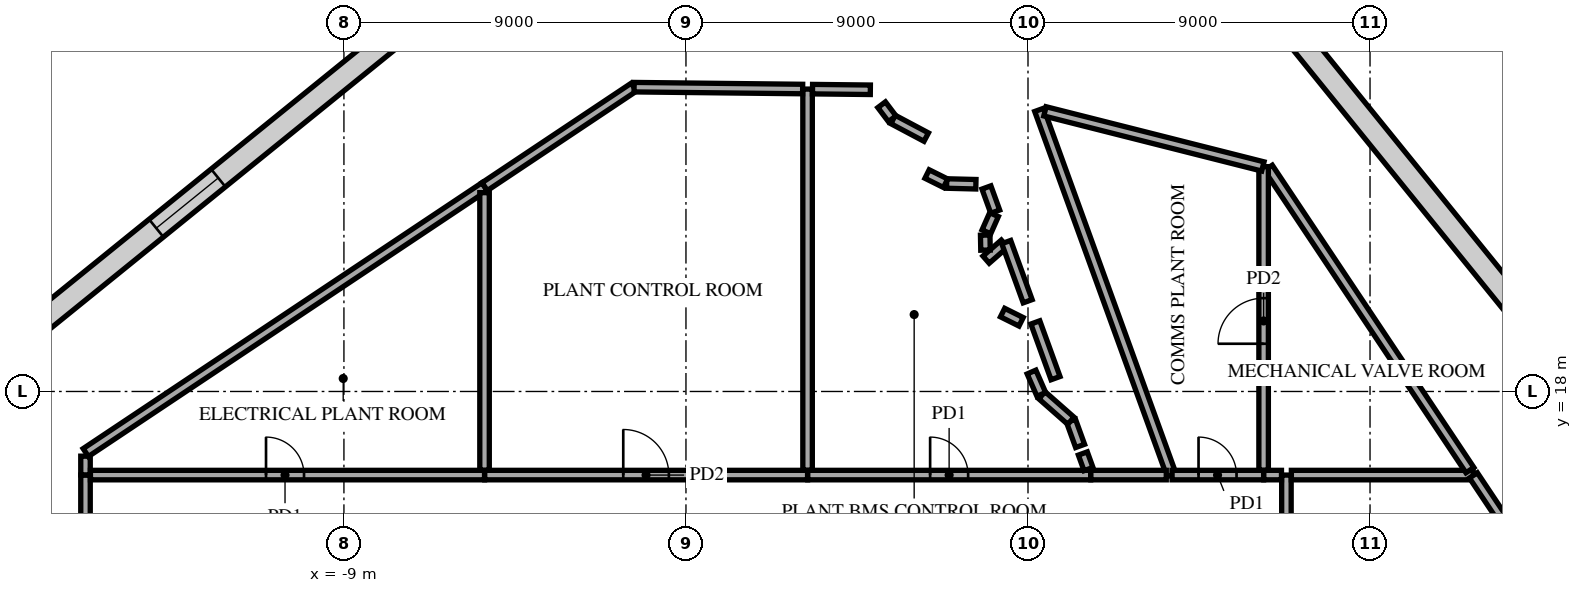
"""IFC4 building model, lengths in metres.
Left out: names, types, materials, properties, quantities, classifications, styles, units other than length and angle.
Written with IfcOpenShell. Run it as: python <this file> out.ifc"""

import sys

from ifc_helpers import new_model, si_unit, direction, frame, frame_2d, origin, place, context, subcontext, project, spatial, rectangle, extrude, element, fill, save


model = new_model("IFC4")
c1 = context("Model", 3, precision=1e-05, world=origin(), true_north=direction((0.0, 1.0)))
c2 = subcontext(c1, "Body", "Model", "MODEL_VIEW")
j1 = project(units=[si_unit("LENGTHUNIT", "METRE"), si_unit("PLANEANGLEUNIT", "RADIAN")], contexts=[c1])
p1 = place(None, origin())
s1 = spatial("IfcSite", under=j1, at=p1, CompositionType="ELEMENT")
p2 = place(p1, origin())
s2 = spatial("IfcBuilding", under=s1, at=p2, CompositionType="ELEMENT")
p3 = place(p2, frame((0.0, 0.0, 183.7)))
s3 = spatial("IfcBuildingStorey", under=s2, at=p3, CompositionType="ELEMENT", Elevation=183.7)
p4 = place(p3, frame((15.8, 7.305, 0.0), z_axis=(0.0, 0.0, 1.0), x_axis=(0.0, 1.0, 0.0)))
e1 = element("IfcWall", 1, at=p4, inside=s3, PredefinedType="PARTITIONING", context=c2, shape_type="SweptSolid", body=[
    extrude(rectangle(XDim=8.495, YDim=0.25, at=frame_2d((4.248, 0.0))), origin(), (0.0, 0.0, 1.0), 4.65),
])
p5 = place(p4, frame((3.645, 0.0, 0.0)))
e2 = element("IfcOpeningElement", 2, at=p5, cuts=e1, PredefinedType="OPENING", context=c2, shape_type="SweptSolid", body=[
    extrude(rectangle(XDim=1.2, YDim=2.1, at=frame_2d((0.6, 1.05))), frame((0.0, 0.135, 0.0), z_axis=(0.0, -1.0, 0.0), x_axis=(1.0, 0.0, 0.0)), (0.0, 0.0, 1.0), 0.27),
])
p6 = place(p3, frame((-15.8, 10.254, 0.0), z_axis=(0.0, 0.0, 1.0), x_axis=(0.0, 1.0, 0.0)))
e3 = element("IfcWall", 3, at=p6, inside=s3, PredefinedType="PARTITIONING", context=c2, shape_type="SweptSolid", body=[
    extrude(rectangle(XDim=5.546, YDim=0.25, at=frame_2d((2.773, 0.0))), origin(), (0.0, 0.0, 1.0), 4.65),
])
p7 = place(p3, frame((-15.8, 15.805, 0.0), z_axis=(0.0, 0.0, 1.0), x_axis=(0.0, 1.0, 0.0)))
e4 = element("IfcWall", 4, at=p7, inside=s3, PredefinedType="PARTITIONING", context=c2, shape_type="SweptSolid", body=[
    extrude(rectangle(XDim=0.493, YDim=0.25, at=frame_2d((0.246, 0.0))), origin(), (0.0, 0.0, 1.0), 4.386),
])
p8 = place(p3, frame((-15.67, 15.8, 0.0), z_axis=(0.0, 0.0, 1.0), x_axis=(1.0, 0.0, 0.0)))
e5 = element("IfcWall", 5, at=p8, inside=s3, PredefinedType="PARTITIONING", context=c2, shape_type="SweptSolid", body=[
    extrude(rectangle(XDim=10.37, YDim=0.25, at=frame_2d((5.185, 0.0))), origin(), (0.0, 0.0, 1.0), 4.65),
])
p9 = place(p8, frame((4.62, 0.0, 0.0)))
e6 = element("IfcOpeningElement", 6, at=p9, cuts=e5, PredefinedType="OPENING", context=c2, shape_type="SweptSolid", body=[
    extrude(rectangle(XDim=1.0, YDim=2.1, at=frame_2d((0.5, 1.05))), frame((0.0, 0.135, 0.0), z_axis=(0.0, -1.0, 0.0), x_axis=(1.0, 0.0, 0.0)), (0.0, 0.0, 1.0), 0.27),
])
p10 = place(p3, frame((-5.295, 15.8, 0.0), z_axis=(0.0, 0.0, 1.0), x_axis=(1.0, 0.0, 0.0)))
e7 = element("IfcWall", 7, at=p10, inside=s3, PredefinedType="PARTITIONING", context=c2, shape_type="SweptSolid", body=[
    extrude(rectangle(XDim=8.495, YDim=0.25, at=frame_2d((4.248, 0.0))), origin(), (0.0, 0.0, 1.0), 4.65),
])
p11 = place(p10, frame((3.645, 0.0, 0.0)))
e8 = element("IfcOpeningElement", 8, at=p11, cuts=e7, PredefinedType="OPENING", context=c2, shape_type="SweptSolid", body=[
    extrude(rectangle(XDim=1.2, YDim=2.1, at=frame_2d((0.6, 1.05))), frame((0.0, 0.135, 0.0), z_axis=(0.0, -1.0, 0.0), x_axis=(1.0, 0.0, 0.0)), (0.0, 0.0, 1.0), 0.27),
])
p12 = place(p3, frame((3.205, 15.8, 0.0), z_axis=(0.0, 0.0, 1.0), x_axis=(1.0, 0.0, 0.0)))
e9 = element("IfcWall", 9, at=p12, inside=s3, PredefinedType="PARTITIONING", context=c2, shape_type="SweptSolid", body=[
    extrude(rectangle(XDim=7.444, YDim=0.25, at=frame_2d((3.722, 0.0))), origin(), (0.0, 0.0, 1.0), 4.65),
])
p13 = place(p12, frame((3.219, 0.0, 0.0)))
e10 = element("IfcOpeningElement", 10, at=p13, cuts=e9, PredefinedType="OPENING", context=c2, shape_type="SweptSolid", body=[
    extrude(rectangle(XDim=1.0, YDim=2.1, at=frame_2d((0.5, 1.05))), frame((0.0, 0.135, 0.0), z_axis=(0.0, -1.0, 0.0), x_axis=(1.0, 0.0, 0.0)), (0.0, 0.0, 1.0), 0.27),
])
p14 = place(p3, frame((9.294, 25.41, 0.0), z_axis=(0.0, 0.0, 1.0), x_axis=(0.340684270524, -0.940177763945, 0.0)))
e11 = element("IfcWall", 11, at=p14, inside=s3, PredefinedType="PARTITIONING", context=c2, shape_type="SweptSolid", body=[
    extrude(rectangle(XDim=10.222, YDim=0.25, at=frame_2d((5.111, 0.0))), origin(), (0.0, 0.0, 1.0), 4.65),
])
p15 = place(p3, frame((10.654, 15.8, 0.0), z_axis=(0.0, 0.0, 1.0), x_axis=(1.0, 0.0, 0.0)))
e12 = element("IfcWall", 12, at=p15, inside=s3, PredefinedType="PARTITIONING", context=c2, shape_type="SweptSolid", body=[
    extrude(rectangle(XDim=1.984, YDim=0.25, at=frame_2d((0.992, 0.0))), origin(), (0.0, 0.0, 1.0), 5.22),
])
p16 = place(p3, frame((12.791, 15.8, 0.0), z_axis=(0.0, 0.0, 1.0), x_axis=(1.0, 0.0, 0.0)))
e13 = element("IfcWall", 13, at=p16, inside=s3, PredefinedType="PARTITIONING", context=c2, shape_type="SweptSolid", body=[
    extrude(rectangle(XDim=2.409, YDim=0.25, at=frame_2d((1.204, 0.0))), origin(), (0.0, 0.0, 1.0), 4.65),
])
p17 = place(p16, frame((0.696, 0.0, 0.0)))
e14 = element("IfcOpeningElement", 14, at=p17, cuts=e13, PredefinedType="OPENING", context=c2, shape_type="SweptSolid", body=[
    extrude(rectangle(XDim=1.0, YDim=2.1, at=frame_2d((0.5, 1.05))), frame((0.0, 0.135, 0.0), z_axis=(0.0, -1.0, 0.0), x_axis=(1.0, 0.0, 0.0)), (0.0, 0.0, 1.0), 0.27),
])
p18 = place(p3, frame((15.205, 15.8, 0.0), z_axis=(0.0, 0.0, 1.0), x_axis=(1.0, 0.0, 0.0)))
e15 = element("IfcWall", 15, at=p18, inside=s3, PredefinedType="PARTITIONING", context=c2, shape_type="SweptSolid", body=[
    extrude(rectangle(XDim=0.465, YDim=0.25, at=frame_2d((0.232, 0.0))), origin(), (0.0, 0.0, 1.0), 4.65),
])
p19 = place(p3, frame((15.93, 15.8, 0.0), z_axis=(0.0, 0.0, 1.0), x_axis=(1.0, 0.0, 0.0)))
e16 = element("IfcWall", 16, at=p19, inside=s3, PredefinedType="PARTITIONING", context=c2, shape_type="SweptSolid", body=[
    extrude(rectangle(XDim=4.785, YDim=0.25, at=frame_2d((2.393, 0.0))), origin(), (0.0, 0.0, 1.0), 5.22),
])
p20 = place(p3, frame((20.72, 15.792, 0.0), z_axis=(0.0, 0.0, 1.0), x_axis=(0.554728223717, -0.832031608661, 0.0)))
e17 = element("IfcWall", 17, at=p20, inside=s3, PredefinedType="PARTITIONING", context=c2, shape_type="SweptSolid", body=[
    extrude(rectangle(XDim=10.051, YDim=0.25, at=frame_2d((5.025, 0.0))), origin(), (0.0, 0.0, 1.0), 4.65),
])
p21 = place(p3, frame((10.443, 16.368, 0.0), z_axis=(0.0, 0.0, 1.0), x_axis=(0.340799323621, -0.940136065162, 0.0)))
e18 = element("IfcWall", 18, at=p21, inside=s3, PredefinedType="PARTITIONING", context=c2, shape_type="SweptSolid", body=[
    extrude(rectangle(XDim=0.436, YDim=0.25, at=frame_2d((0.218, 0.0))), origin(), (0.0, 0.0, 1.0), 4.65),
])
p22 = place(p3, frame((-15.792, 16.393, 0.0), z_axis=(0.0, 0.0, 1.0), x_axis=(0.832017530487, 0.554749338858, 0.0)))
e19 = element("IfcWall", 19, at=p22, inside=s3, PredefinedType="PARTITIONING", context=c2, shape_type="SweptSolid", body=[
    extrude(rectangle(XDim=12.611, YDim=0.25, at=frame_2d((6.305, 0.0))), origin(), (0.0, 0.0, 1.0), 4.386),
])
p23 = place(p3, frame((10.133, 17.226, 0.0), z_axis=(0.0, 0.0, 1.0), x_axis=(0.340483580909, -0.940250461915, 0.0)))
e20 = element("IfcWall", 20, at=p23, inside=s3, PredefinedType="PARTITIONING", context=c2, shape_type="SweptSolid", body=[
    extrude(rectangle(XDim=0.7, YDim=0.25, at=frame_2d((0.35, 0.0))), origin(), (0.0, 0.0, 1.0), 4.65),
])
p24 = place(p3, frame((9.367, 17.9, 0.0), z_axis=(0.0, 0.0, 1.0), x_axis=(0.750694411998, -0.660649604401, 0.0)))
e21 = element("IfcWall", 21, at=p24, inside=s3, PredefinedType="PARTITIONING", context=c2, shape_type="SweptSolid", body=[
    extrude(rectangle(XDim=1.014, YDim=0.25, at=frame_2d((0.507, 0.0))), origin(), (0.0, 0.0, 1.0), 4.65),
])
p25 = place(p3, frame((9.093, 18.511, 0.0), z_axis=(0.0, 0.0, 1.0), x_axis=(0.400659145617, -0.916227181999, 0.0)))
e22 = element("IfcWall", 22, at=p25, inside=s3, PredefinedType="PARTITIONING", context=c2, shape_type="SweptSolid", body=[
    extrude(rectangle(XDim=0.642, YDim=0.25, at=frame_2d((0.321, 0.0))), origin(), (0.0, 0.0, 1.0), 5.22),
])
p26 = place(p3, frame((9.194, 19.818, 0.0), z_axis=(0.0, 0.0, 1.0), x_axis=(0.340586616003, -0.940213144452, 0.0)))
e23 = element("IfcWall", 23, at=p26, inside=s3, PredefinedType="PARTITIONING", context=c2, shape_type="SweptSolid", body=[
    extrude(rectangle(XDim=1.56, YDim=0.25, at=frame_2d((0.78, 0.0))), origin(), (0.0, 0.0, 1.0), 5.22),
])
p27 = place(p3, frame((8.331, 20.076, 0.0), z_axis=(0.0, 0.0, 1.0), x_axis=(0.895054417189, -0.445956937687, 0.0)))
e24 = element("IfcWall", 24, at=p27, inside=s3, PredefinedType="PARTITIONING", context=c2, shape_type="SweptSolid", body=[
    extrude(rectangle(XDim=0.544, YDim=0.25, at=frame_2d((0.272, 0.0))), origin(), (0.0, 0.0, 1.0), 5.22),
])
p28 = place(p3, frame((7.897, 21.469, 0.0), z_axis=(0.0, 0.0, 1.0), x_axis=(0.753424657534, 0.657534246575, 0.0)))
e25 = element("IfcWall", 25, at=p28, inside=s3, PredefinedType="PARTITIONING", context=c2, shape_type="SweptSolid", body=[
    extrude(rectangle(XDim=0.642, YDim=0.25, at=frame_2d((0.321, 0.0))), origin(), (0.0, 0.0, 1.0), 5.22),
])
p29 = place(p3, frame((8.427, 21.932, 0.0), z_axis=(0.0, 0.0, 1.0), x_axis=(0.340712993314, -0.940167355414, 0.0)))
e26 = element("IfcWall", 26, at=p29, inside=s3, PredefinedType="PARTITIONING", context=c2, shape_type="SweptSolid", body=[
    extrude(rectangle(XDim=1.656, YDim=0.25, at=frame_2d((0.828, 0.0))), origin(), (0.0, 0.0, 1.0), 5.22),
])
p30 = place(p3, frame((7.874, 22.115, 0.0), z_axis=(0.0, 0.0, 1.0), x_axis=(0.019132299867, -0.999816960799, 0.0)))
e27 = element("IfcWall", 27, at=p30, inside=s3, PredefinedType="PARTITIONING", context=c2, shape_type="SweptSolid", body=[
    extrude(rectangle(XDim=0.396, YDim=0.25, at=frame_2d((0.198, 0.0))), origin(), (0.0, 0.0, 1.0), 5.22),
])
p31 = place(p3, frame((7.906, 22.201, 0.0), z_axis=(0.0, 0.0, 1.0), x_axis=(0.404855396111, 0.9143807239, 0.0)))
e28 = element("IfcWall", 28, at=p31, inside=s3, PredefinedType="PARTITIONING", context=c2, shape_type="SweptSolid", body=[
    extrude(rectangle(XDim=0.494, YDim=0.25, at=frame_2d((0.247, 0.0))), origin(), (0.0, 0.0, 1.0), 5.22),
])
p32 = place(p3, frame((7.906, 23.369, 0.0), z_axis=(0.0, 0.0, 1.0), x_axis=(0.340874962081, -0.940108642778, 0.0)))
e29 = element("IfcWall", 29, at=p32, inside=s3, PredefinedType="PARTITIONING", context=c2, shape_type="SweptSolid", body=[
    extrude(rectangle(XDim=0.677, YDim=0.25, at=frame_2d((0.339, 0.0))), origin(), (0.0, 0.0, 1.0), 5.22),
])
p33 = place(p3, frame((-5.3, 15.93, 0.0), z_axis=(0.0, 0.0, 1.0), x_axis=(0.0, 1.0, 0.0)))
e30 = element("IfcWall", 30, at=p33, inside=s3, PredefinedType="PARTITIONING", context=c2, shape_type="SweptSolid", body=[
    extrude(rectangle(XDim=7.302, YDim=0.25, at=frame_2d((3.651, 0.0))), origin(), (0.0, 0.0, 1.0), 5.22),
])
p34 = place(p3, frame((-5.296, 23.391, 0.0), z_axis=(0.0, 0.0, 1.0), x_axis=(0.831994551778, 0.554783800964, 0.0)))
e31 = element("IfcWall", 31, at=p34, inside=s3, PredefinedType="PARTITIONING", context=c2, shape_type="SweptSolid", body=[
    extrude(rectangle(XDim=4.717, YDim=0.25, at=frame_2d((2.358, 0.0))), origin(), (0.0, 0.0, 1.0), 4.65),
])
p35 = place(p3, frame((6.86, 23.473, 0.0), z_axis=(0.0, 0.0, 1.0), x_axis=(0.999677861021, -0.02538058676, 0.0)))
e32 = element("IfcWall", 32, at=p35, inside=s3, PredefinedType="PARTITIONING", context=c2, shape_type="SweptSolid", body=[
    extrude(rectangle(XDim=0.77, YDim=0.25, at=frame_2d((0.385, 0.0))), origin(), (0.0, 0.0, 1.0), 5.22),
])
p36 = place(p3, frame((6.344, 23.722, 0.0), z_axis=(0.0, 0.0, 1.0), x_axis=(0.89550135363, -0.445058788978, 0.0)))
e33 = element("IfcWall", 33, at=p36, inside=s3, PredefinedType="PARTITIONING", context=c2, shape_type="SweptSolid", body=[
    extrude(rectangle(XDim=0.544, YDim=0.25, at=frame_2d((0.272, 0.0))), origin(), (0.0, 0.0, 1.0), 5.22),
])
p37 = place(p3, frame((15.324, 23.885, 0.0), z_axis=(0.0, 0.0, 1.0), x_axis=(0.554717873221, -0.832038509403, 0.0)))
e34 = element("IfcWall", 34, at=p37, inside=s3, PredefinedType="PARTITIONING", context=c2, shape_type="SweptSolid", body=[
    extrude(rectangle(XDim=9.562, YDim=0.25, at=frame_2d((4.781, 0.0))), origin(), (0.0, 0.0, 1.0), 4.386),
])
p38 = place(p3, frame((15.2, 15.93, 0.0), z_axis=(0.0, 0.0, 1.0), x_axis=(0.0, 1.0, 0.0)))
e35 = element("IfcWall", 35, at=p38, inside=s3, PredefinedType="PARTITIONING", context=c2, shape_type="SweptSolid", body=[
    extrude(rectangle(XDim=7.987, YDim=0.25, at=frame_2d((3.993, 0.0))), origin(), (0.0, 0.0, 1.0), 4.386),
])
p39 = place(p38, frame((3.326, 0.0, 0.0)))
e36 = element("IfcOpeningElement", 36, at=p39, cuts=e35, PredefinedType="OPENING", context=c2, shape_type="SweptSolid", body=[
    extrude(rectangle(XDim=1.2, YDim=2.1, at=frame_2d((0.6, 1.05))), frame((0.0, 0.135, 0.0), z_axis=(0.0, -1.0, 0.0), x_axis=(1.0, 0.0, 0.0)), (0.0, 0.0, 1.0), 0.27),
])
p40 = place(p3, frame((5.449, 25.158, 0.0), z_axis=(0.0, 0.0, 1.0), x_axis=(0.883138107458, -0.469113081416, 0.0)))
e37 = element("IfcWall", 37, at=p40, inside=s3, PredefinedType="PARTITIONING", context=c2, shape_type="SweptSolid", body=[
    extrude(rectangle(XDim=0.988, YDim=0.25, at=frame_2d((0.494, 0.0))), origin(), (0.0, 0.0, 1.0), 4.65),
])
p41 = place(p3, frame((9.446, 25.372, 0.0), z_axis=(0.0, 0.0, 1.0), x_axis=(0.969473533102, -0.245195980015, 0.0)))
e38 = element("IfcWall", 38, at=p41, inside=s3, PredefinedType="PARTITIONING", context=c2, shape_type="SweptSolid", body=[
    extrude(rectangle(XDim=5.915, YDim=0.25, at=frame_2d((2.957, 0.0))), origin(), (0.0, 0.0, 1.0), 4.386),
])
p42 = place(p3, frame((5.149, 25.546, 0.0), z_axis=(0.0, 0.0, 1.0), x_axis=(0.601943047413, -0.798539020756, 0.0)))
e39 = element("IfcWall", 39, at=p42, inside=s3, PredefinedType="PARTITIONING", context=c2, shape_type="SweptSolid", body=[
    extrude(rectangle(XDim=0.462, YDim=0.25, at=frame_2d((0.231, 0.0))), origin(), (0.0, 0.0, 1.0), 5.22),
])
p43 = place(p3, frame((3.2, 15.93, 0.0), z_axis=(0.0, 0.0, 1.0), x_axis=(0.0, 1.0, 0.0)))
e40 = element("IfcWall", 40, at=p43, inside=s3, PredefinedType="PARTITIONING", context=c2, shape_type="SweptSolid", body=[
    extrude(rectangle(XDim=10.028, YDim=0.25, at=frame_2d((5.014, 0.0))), origin(), (0.0, 0.0, 1.0), 4.4),
])
p44 = place(p3, frame((3.33, 25.956, 0.0), z_axis=(0.0, 0.0, 1.0), x_axis=(0.999938731956, -0.011069432457, 0.0)))
e41 = element("IfcWall", 41, at=p44, inside=s3, PredefinedType="PARTITIONING", context=c2, shape_type="SweptSolid", body=[
    extrude(rectangle(XDim=1.522, YDim=0.25, at=frame_2d((0.761, 0.0))), origin(), (0.0, 0.0, 1.0), 5.22),
])
p45 = place(p3, frame((-1.365, 26.008, 0.0), z_axis=(0.0, 0.0, 1.0), x_axis=(0.999939413442, -0.011007699399, 0.0)))
e42 = element("IfcWall", 42, at=p45, inside=s3, PredefinedType="PARTITIONING", context=c2, shape_type="SweptSolid", body=[
    extrude(rectangle(XDim=4.436, YDim=0.25, at=frame_2d((2.218, 0.0))), origin(), (0.0, 0.0, 1.0), 4.4),
])
p46 = place(p3, frame((2.615, 35.702, 0.0), z_axis=(0.0, 0.0, 1.0), x_axis=(-0.777144452625, -0.629322254297, 0.0)))
e43 = element("IfcWall", 43, at=p46, inside=s3, PredefinedType="STANDARD", context=c2, shape_type="SweptSolid", body=[
    extrude(rectangle(XDim=49.376, YDim=0.6, at=frame_2d((24.688, 0.0))), origin(), (0.0, 0.0, 1.0), 5.22),
])
p47 = place(p46, frame((1.2, 0.0, 0.6)))
e44 = element("IfcOpeningElement", 44, at=p47, cuts=e43, PredefinedType="OPENING", context=c2, shape_type="SweptSolid", body=[
    extrude(rectangle(XDim=2.1, YDim=4.17, at=frame_2d((1.05, 2.085))), frame((0.0, 0.31, 0.0), z_axis=(0.0, -1.0, 0.0), x_axis=(1.0, 0.0, 0.0)), (0.0, 0.0, 1.0), 0.62),
])
p48 = place(p46, frame((5.7, 0.0, 0.6)))
e45 = element("IfcOpeningElement", 45, at=p48, cuts=e43, PredefinedType="OPENING", context=c2, shape_type="SweptSolid", body=[
    extrude(rectangle(XDim=2.1, YDim=4.17, at=frame_2d((1.05, 2.085))), frame((0.0, 0.31, 0.0), z_axis=(0.0, -1.0, 0.0), x_axis=(1.0, 0.0, 0.0)), (0.0, 0.0, 1.0), 0.62),
])
p49 = place(p46, frame((10.2, 0.0, 0.6)))
e46 = element("IfcOpeningElement", 46, at=p49, cuts=e43, PredefinedType="OPENING", context=c2, shape_type="SweptSolid", body=[
    extrude(rectangle(XDim=2.1, YDim=4.17, at=frame_2d((1.05, 2.085))), frame((0.0, 0.31, 0.0), z_axis=(0.0, -1.0, 0.0), x_axis=(1.0, 0.0, 0.0)), (0.0, 0.0, 1.0), 0.62),
])
p50 = place(p46, frame((19.2, 0.0, 0.6)))
e47 = element("IfcOpeningElement", 47, at=p50, cuts=e43, PredefinedType="OPENING", context=c2, shape_type="SweptSolid", body=[
    extrude(rectangle(XDim=2.1, YDim=4.17, at=frame_2d((1.05, 2.085))), frame((0.0, 0.31, 0.0), z_axis=(0.0, -1.0, 0.0), x_axis=(1.0, 0.0, 0.0)), (0.0, 0.0, 1.0), 0.62),
])
p51 = place(p46, frame((41.7, 0.0, 0.6)))
e48 = element("IfcOpeningElement", 48, at=p51, cuts=e43, PredefinedType="OPENING", context=c2, shape_type="SweptSolid", body=[
    extrude(rectangle(XDim=2.1, YDim=4.17, at=frame_2d((1.05, 2.085))), frame((0.0, 0.31, 0.0), z_axis=(0.0, -1.0, 0.0), x_axis=(1.0, 0.0, 0.0)), (0.0, 0.0, 1.0), 0.62),
])
p52 = place(p46, frame((46.138, 0.0, 0.6)))
e49 = element("IfcOpeningElement", 49, at=p52, cuts=e43, PredefinedType="OPENING", context=c2, shape_type="SweptSolid", body=[
    extrude(rectangle(XDim=2.1, YDim=4.17, at=frame_2d((1.05, 2.085))), frame((0.0, 0.31, 0.0), z_axis=(0.0, -1.0, 0.0), x_axis=(1.0, 0.0, 0.0)), (0.0, 0.0, 1.0), 0.62),
])
p53 = place(p3, frame((36.47, 2.156, 0.0), z_axis=(0.0, 0.0, 1.0), x_axis=(-0.62932061547, 0.777145779725, 0.0)))
e50 = element("IfcWall", 50, at=p53, inside=s3, PredefinedType="STANDARD", context=c2, shape_type="SweptSolid", body=[
    extrude(rectangle(XDim=42.176, YDim=0.6, at=frame_2d((21.088, 0.0))), origin(), (0.0, 0.0, 1.0), 5.22),
])
p54 = place(p53, frame((1.138, 0.0, 0.6)))
e51 = element("IfcOpeningElement", 51, at=p54, cuts=e50, PredefinedType="OPENING", context=c2, shape_type="SweptSolid", body=[
    extrude(rectangle(XDim=2.3, YDim=4.17, at=frame_2d((1.15, 2.085))), frame((0.0, 0.31, 0.0), z_axis=(0.0, -1.0, 0.0), x_axis=(1.0, 0.0, 0.0)), (0.0, 0.0, 1.0), 0.62),
])
p55 = place(p53, frame((5.776, 0.0, 0.6)))
e52 = element("IfcOpeningElement", 52, at=p55, cuts=e50, PredefinedType="OPENING", context=c2, shape_type="SweptSolid", body=[
    extrude(rectangle(XDim=2.3, YDim=4.17, at=frame_2d((1.15, 2.085))), frame((0.0, 0.31, 0.0), z_axis=(0.0, -1.0, 0.0), x_axis=(1.0, 0.0, 0.0)), (0.0, 0.0, 1.0), 0.62),
])
p56 = place(p53, frame((33.976, 0.0, 0.6)))
e53 = element("IfcOpeningElement", 53, at=p56, cuts=e50, PredefinedType="OPENING", context=c2, shape_type="SweptSolid", body=[
    extrude(rectangle(XDim=2.3, YDim=4.17, at=frame_2d((1.15, 2.085))), frame((0.0, 0.31, 0.0), z_axis=(0.0, -1.0, 0.0), x_axis=(1.0, 0.0, 0.0)), (0.0, 0.0, 1.0), 0.62),
])
p57 = place(p53, frame((38.676, 0.0, 0.6)))
e54 = element("IfcOpeningElement", 54, at=p57, cuts=e50, PredefinedType="OPENING", context=c2, shape_type="SweptSolid", body=[
    extrude(rectangle(XDim=2.3, YDim=4.17, at=frame_2d((1.15, 2.085))), frame((0.0, 0.31, 0.0), z_axis=(0.0, -1.0, 0.0), x_axis=(1.0, 0.0, 0.0)), (0.0, 0.0, 1.0), 0.62),
])
p58 = place(p9, origin())
e55 = element("IfcDoor", 55, at=p58, inside=s3, OperationType="SINGLE_SWING_RIGHT", PredefinedType="DOOR", context=c2, shape_type="SweptSolid", body=[
    extrude(rectangle(XDim=1.0, YDim=2.1, at=frame_2d((0.5, 1.05))), frame((0.0, 0.025, 0.0), z_axis=(0.0, -1.0, 0.0), x_axis=(1.0, 0.0, 0.0)), (0.0, 0.0, 1.0), 0.05),
])
fill(e6, e55)
p59 = place(p11, origin())
e56 = element("IfcDoor", 56, at=p59, inside=s3, OperationType="SINGLE_SWING_LEFT", PredefinedType="DOOR", context=c2, shape_type="SweptSolid", body=[
    extrude(rectangle(XDim=1.2, YDim=2.1, at=frame_2d((0.6, 1.05))), frame((0.0, 0.025, 0.0), z_axis=(0.0, -1.0, 0.0), x_axis=(1.0, 0.0, 0.0)), (0.0, 0.0, 1.0), 0.05),
])
fill(e8, e56)
p60 = place(p13, origin())
e57 = element("IfcDoor", 57, at=p60, inside=s3, OperationType="SINGLE_SWING_RIGHT", PredefinedType="DOOR", context=c2, shape_type="SweptSolid", body=[
    extrude(rectangle(XDim=1.0, YDim=2.1, at=frame_2d((0.5, 1.05))), frame((0.0, 0.025, 0.0), z_axis=(0.0, -1.0, 0.0), x_axis=(1.0, 0.0, 0.0)), (0.0, 0.0, 1.0), 0.05),
])
fill(e10, e57)
p61 = place(p17, origin())
e58 = element("IfcDoor", 58, at=p61, inside=s3, OperationType="SINGLE_SWING_LEFT", PredefinedType="DOOR", context=c2, shape_type="SweptSolid", body=[
    extrude(rectangle(XDim=1.0, YDim=2.1, at=frame_2d((0.5, 1.05))), frame((0.0, 0.025, 0.0), z_axis=(0.0, -1.0, 0.0), x_axis=(1.0, 0.0, 0.0)), (0.0, 0.0, 1.0), 0.05),
])
fill(e14, e58)
p62 = place(p39, origin())
e59 = element("IfcDoor", 59, at=p62, inside=s3, OperationType="SINGLE_SWING_RIGHT", PredefinedType="DOOR", context=c2, shape_type="SweptSolid", body=[
    extrude(rectangle(XDim=1.2, YDim=2.1, at=frame_2d((0.6, 1.05))), frame((0.0, 0.025, 0.0), z_axis=(0.0, -1.0, 0.0), x_axis=(1.0, 0.0, 0.0)), (0.0, 0.0, 1.0), 0.05),
])
fill(e36, e59)
p63 = place(p50, origin())
e60 = element("IfcWindow", 60, at=p63, inside=s3, PartitioningType="SINGLE_PANEL", PredefinedType="USERDEFINED", context=c2, shape_type="SweptSolid", body=[
    extrude(rectangle(XDim=2.1, YDim=4.17, at=frame_2d((1.05, 2.085))), frame((0.0, 0.03, 0.0), z_axis=(0.0, -1.0, 0.0), x_axis=(1.0, 0.0, 0.0)), (0.0, 0.0, 1.0), 0.06),
])
fill(e47, e60)
save(model, sys.argv[1])
